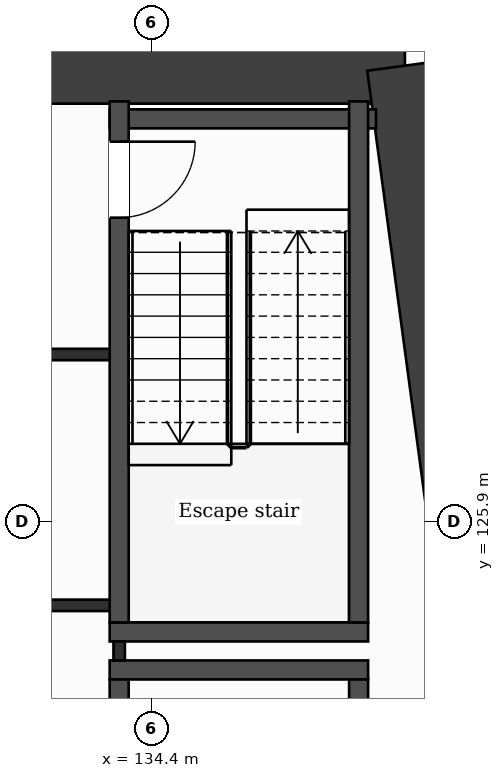
"""IFC4 building model, lengths in metres.
Left out: names, types, materials, properties, quantities, classifications, styles, units other than length and angle.
Written with IfcOpenShell. Run it as: python <this file> out.ifc"""

import sys

from ifc_helpers import new_model, si_unit, direction, frame, frame_2d, origin, place, context, subcontext, project, spatial, rectangle, extrude, element, fill, save


model = new_model("IFC4")
c1 = context("Model", 3, precision=1e-05, world=origin(), true_north=direction((0.0, 1.0)))
c2 = subcontext(c1, "Body", "Model", "MODEL_VIEW")
j1 = project(units=[si_unit("LENGTHUNIT", "METRE"), si_unit("PLANEANGLEUNIT", "RADIAN")], contexts=[c1])
p1 = place(None, origin())
s1 = spatial("IfcSite", under=j1, at=p1, CompositionType="ELEMENT")
p2 = place(p1, origin())
s2 = spatial("IfcBuilding", under=s1, at=p2, CompositionType="ELEMENT")
p3 = place(p2, frame((0.0, 0.0, 105.8)))
s3 = spatial("IfcBuildingStorey", under=s2, at=p3, CompositionType="ELEMENT", Elevation=105.8)
p4 = place(p3, frame((126.5, 131.9, 0.0), z_axis=(0.0, 0.0, 1.0), x_axis=(1.0, 0.0, 0.0)))
e1 = element("IfcWall", 1, at=p4, inside=s3, PredefinedType="SHEAR", context=c2, shape_type="SweptSolid", body=[
    extrude(rectangle(XDim=11.232, YDim=1.0, at=frame_2d((5.616, 0.0))), origin(), (0.0, 0.0, 1.0), 3.7),
])
p5 = place(p4, frame((3.386, 0.0, 0.0)))
e2 = element("IfcOpeningElement", 2, at=p5, cuts=e1, PredefinedType="OPENING", context=c2, shape_type="SweptSolid", body=[
    extrude(rectangle(XDim=1.2, YDim=2.1, at=frame_2d((0.6, 1.05))), frame((0.0, 0.51, 0.0), z_axis=(0.0, -1.0, 0.0), x_axis=(1.0, 0.0, 0.0)), (0.0, 0.0, 1.0), 1.02),
])
p6 = place(p3, frame((137.732, 131.9, 0.0), z_axis=(0.0, 0.0, 1.0), x_axis=(0.133411141623, -0.991060778808, 0.0)))
e3 = element("IfcWall", 3, at=p6, inside=s3, PredefinedType="SHEAR", context=c2, shape_type="SweptSolid", body=[
    extrude(rectangle(XDim=21.189, YDim=1.0, at=frame_2d((10.595, 0.0))), origin(), (0.0, 0.0, 1.0), 3.7),
])
for number, where, z_axis, x_axis in (
    (4, (133.848, 123.95, 0.0), (0.0, 0.0, 1.0), (1.0, 0.0, 0.0)),
    (5, (133.848, 124.45, 0.0), (0.0, 0.0, 1.0), (1.0, 0.0, 0.0)),
):
    element("IfcWall", number, at=place(p3, frame(where, z_axis=z_axis, x_axis=x_axis)), inside=s3, PredefinedType="PARTITIONING", context=c2, shape_type="SweptSolid", body=[
        extrude(rectangle(XDim=3.4, YDim=0.25, at=frame_2d((1.7, 0.0))), origin(), (0.0, 0.0, 1.0), 3.38),
    ])
p7 = place(p3, frame((131.649, 124.8, 0.0), z_axis=(0.0, 0.0, 1.0), x_axis=(1.0, 0.0, 0.0)))
e6 = element("IfcWall", 6, at=p7, inside=s3, PredefinedType="PARTITIONING", context=c2, shape_type="SweptSolid", body=[
    extrude(rectangle(XDim=2.449, YDim=0.15, at=frame_2d((1.225, 0.0))), origin(), (0.0, 0.0, 1.0), 3.38),
])
p8 = place(p3, frame((131.649, 128.1, 0.0), z_axis=(0.0, 0.0, 1.0), x_axis=(1.0, 0.0, 0.0)))
e7 = element("IfcWall", 7, at=p8, inside=s3, PredefinedType="PARTITIONING", context=c2, shape_type="SweptSolid", body=[
    extrude(rectangle(XDim=2.324, YDim=0.15, at=frame_2d((1.162, 0.0))), origin(), (0.0, 0.0, 1.0), 3.38),
])
p9 = place(p3, frame((133.848, 131.2, 0.0), z_axis=(0.0, 0.0, 1.0), x_axis=(1.0, 0.0, 0.0)))
e8 = element("IfcWall", 8, at=p9, inside=s3, PredefinedType="PARTITIONING", context=c2, shape_type="SweptSolid", body=[
    extrude(rectangle(XDim=3.504, YDim=0.25, at=frame_2d((1.752, 0.0))), origin(), (0.0, 0.0, 1.0), 3.38),
])
p10 = place(p3, frame((133.973, 124.075, 0.0), z_axis=(0.0, 0.0, 1.0), x_axis=(0.0, 1.0, 0.0)))
e9 = element("IfcWall", 9, at=p10, inside=s3, PredefinedType="PARTITIONING", context=c2, shape_type="SweptSolid", body=[
    extrude(rectangle(XDim=0.25, YDim=0.15, at=frame_2d((0.125, 0.0))), origin(), (0.0, 0.0, 1.0), 3.38),
])
p11 = place(p3, frame((133.973, 116.97, 0.0), z_axis=(0.0, 0.0, 1.0), x_axis=(0.0, 1.0, 0.0)))
e10 = element("IfcWall", 10, at=p11, inside=s3, PredefinedType="PARTITIONING", context=c2, shape_type="SweptSolid", body=[
    extrude(rectangle(XDim=6.855, YDim=0.25, at=frame_2d((3.427, 0.0))), origin(), (0.0, 0.0, 1.0), 3.38),
])
p12 = place(p11, frame((5.555, 0.0, 0.0)))
e11 = element("IfcOpeningElement", 11, at=p12, cuts=e10, PredefinedType="OPENING", context=c2, shape_type="SweptSolid", body=[
    extrude(rectangle(XDim=0.95, YDim=2.1, at=frame_2d((0.475, 1.05))), frame((0.0, 0.135, 0.0), z_axis=(0.0, -1.0, 0.0), x_axis=(1.0, 0.0, 0.0)), (0.0, 0.0, 1.0), 0.27),
])
p13 = place(p3, frame((133.973, 124.575, 0.0), z_axis=(0.0, 0.0, 1.0), x_axis=(0.0, 1.0, 0.0)))
e12 = element("IfcWall", 12, at=p13, inside=s3, PredefinedType="PARTITIONING", context=c2, shape_type="SweptSolid", body=[
    extrude(rectangle(XDim=6.855, YDim=0.25, at=frame_2d((3.427, 0.0))), origin(), (0.0, 0.0, 1.0), 3.38),
])
p14 = place(p13, frame((5.325, 0.0, 0.0)))
e13 = element("IfcOpeningElement", 13, at=p14, cuts=e12, PredefinedType="OPENING", context=c2, shape_type="SweptSolid", body=[
    extrude(rectangle(XDim=1.0, YDim=2.1, at=frame_2d((0.5, 1.05))), frame((0.0, 0.135, 0.0), z_axis=(0.0, -1.0, 0.0), x_axis=(1.0, 0.0, 0.0)), (0.0, 0.0, 1.0), 0.27),
])
for number, where, z_axis, x_axis in (
    (14, (137.123, 116.97, 0.0), (0.0, 0.0, 1.0), (0.0, 1.0, 0.0)),
    (15, (137.123, 124.575, 0.0), (0.0, 0.0, 1.0), (0.0, 1.0, 0.0)),
):
    element("IfcWall", number, at=place(p3, frame(where, z_axis=z_axis, x_axis=x_axis)), inside=s3, PredefinedType="PARTITIONING", context=c2, shape_type="SweptSolid", body=[
        extrude(rectangle(XDim=6.855, YDim=0.25, at=frame_2d((3.427, 0.0))), origin(), (0.0, 0.0, 1.0), 3.38),
    ])
p15 = place(p14, origin())
e16 = element("IfcDoor", 16, at=p15, inside=s3, OperationType="SINGLE_SWING_RIGHT", PredefinedType="DOOR", context=c2, shape_type="SweptSolid", body=[
    extrude(rectangle(XDim=1.0, YDim=2.1, at=frame_2d((0.5, 1.05))), frame((0.0, 0.025, 0.0), z_axis=(0.0, -1.0, 0.0), x_axis=(1.0, 0.0, 0.0)), (0.0, 0.0, 1.0), 0.05),
])
fill(e13, e16)
save(model, sys.argv[1])
